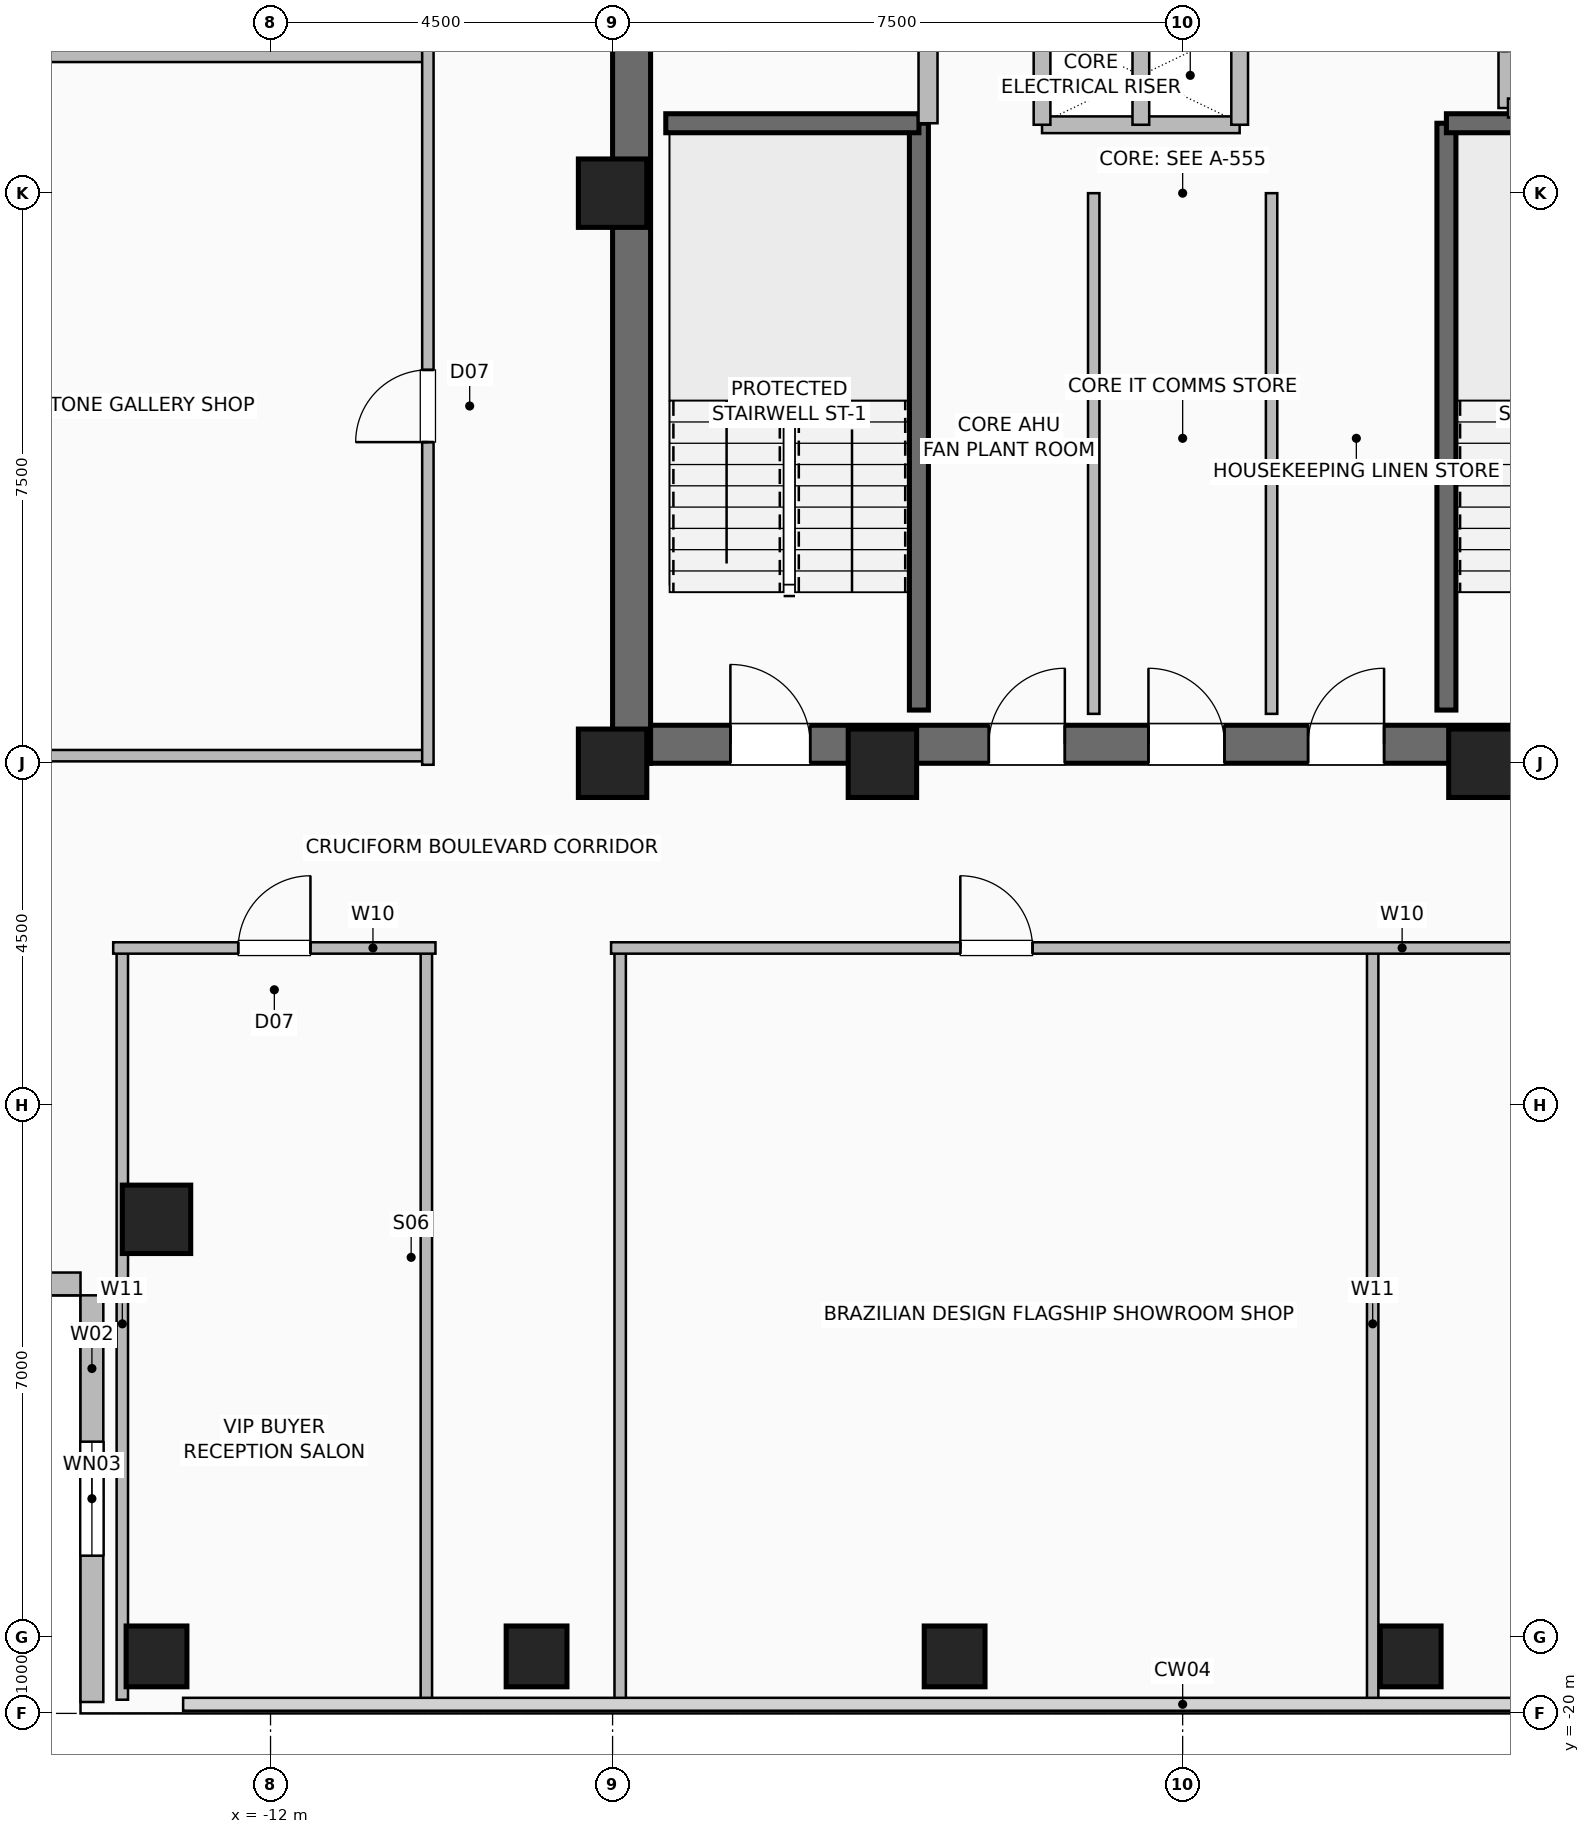
"""IFC4 building model, lengths in metres.
Left out: names, types, materials, properties, quantities, classifications, styles, units other than length and angle.
Written with IfcOpenShell. Run it as: python <this file> out.ifc"""

import sys

from ifc_helpers import new_model, si_unit, direction, frame, frame_2d, origin, origin_2d, place, context, subcontext, project, spatial, rectangle, hollow_rectangle, extrude, element, fill, save


model = new_model("IFC4")
c1 = context("Model", 3, precision=1e-05, world=origin(), true_north=direction((0.0, 1.0)))
c2 = subcontext(c1, "Body", "Model", "MODEL_VIEW")
j1 = project(units=[si_unit("LENGTHUNIT", "METRE"), si_unit("PLANEANGLEUNIT", "RADIAN")], contexts=[c1])
p1 = place(None, origin())
s1 = spatial("IfcSite", under=j1, at=p1, CompositionType="ELEMENT")
p2 = place(p1, origin())
s2 = spatial("IfcBuilding", under=s1, at=p2, CompositionType="ELEMENT")
p3 = place(p2, frame((0.0, 0.0, 220.2)))
s3 = spatial("IfcBuildingStorey", under=s2, at=p3, CompositionType="ELEMENT", Elevation=220.2)
for number, where, z_axis, x_axis in (
    (1, (-7.5, -7.5, 0.0), (0.0, 0.0, 1.0), (1.0, 0.0, 0.0)),
    (2, (-3.95, -7.5, 0.0), (0.0, 0.0, 1.0), (1.0, 0.0, 0.0)),
    (3, (3.95, -7.5, 0.0), (0.0, 0.0, 1.0), (1.0, 0.0, 0.0)),
    (4, (-7.5, 0.0, 0.0), (0.0, 0.0, 1.0), (1.0, 0.0, 0.0)),
):
    element("IfcColumn", number, at=place(p3, frame(where, z_axis=z_axis, x_axis=x_axis)), inside=s3, PredefinedType="COLUMN", context=c2, shape_type="SweptSolid", body=[
        extrude(hollow_rectangle(XDim=0.9, YDim=0.9, WallThickness=0.045, at=origin_2d()), origin(), (0.0, 0.0, 1.0), 3.6),
    ])
for number, where, z_axis, x_axis in (
    (5, (-13.5, -19.25, 0.0), (0.0, 0.0, 1.0), (1.0, 0.0, 0.0)),
    (6, (-8.5, -19.25, 0.0), (0.0, 0.0, 1.0), (1.0, 0.0, 0.0)),
    (7, (-3.0, -19.25, 0.0), (0.0, 0.0, 1.0), (1.0, 0.0, 0.0)),
    (8, (3.0, -19.25, 0.0), (0.0, 0.0, 1.0), (1.0, 0.0, 0.0)),
):
    element("IfcColumn", number, at=place(p3, frame(where, z_axis=z_axis, x_axis=x_axis)), inside=s3, PredefinedType="COLUMN", context=c2, shape_type="SweptSolid", body=[
        extrude(hollow_rectangle(XDim=0.8, YDim=0.8, WallThickness=0.04, at=origin_2d()), origin(), (0.0, 0.0, 1.0), 3.6),
    ])
p4 = place(p3, frame((-13.5, -13.5, 0.0), z_axis=(0.0, 0.0, 1.0), x_axis=(1.0, 0.0, 0.0)))
e9 = element("IfcColumn", 9, at=p4, inside=s3, PredefinedType="COLUMN", context=c2, shape_type="SweptSolid", body=[
    extrude(hollow_rectangle(XDim=0.9, YDim=0.9, WallThickness=0.045, at=origin_2d()), origin(), (0.0, 0.0, 1.0), 3.6),
])
p5 = place(p3, frame((-14.35, -19.85, 0.0), z_axis=(0.0, 0.0, 1.0), x_axis=(0.0, 1.0, 0.0)))
e10 = element("IfcWall", 10, at=p5, inside=s3, PredefinedType="SOLIDWALL", context=c2, shape_type="SweptSolid", body=[
    extrude(rectangle(XDim=5.35, YDim=0.3, at=frame_2d((2.675, 0.0))), origin(), (0.0, 0.0, 1.0), 3.36),
])
p6 = place(p5, frame((1.925, 0.0, 0.9)))
e11 = element("IfcOpeningElement", 11, at=p6, cuts=e10, PredefinedType="OPENING", context=c2, shape_type="SweptSolid", body=[
    extrude(rectangle(XDim=1.5, YDim=1.8, at=frame_2d((0.75, 0.9))), frame((0.0, 0.16, 0.0), z_axis=(0.0, -1.0, 0.0), x_axis=(1.0, 0.0, 0.0)), (0.0, 0.0, 1.0), 0.32),
])
p7 = place(p3, frame((-19.85, -14.35, 0.0), z_axis=(0.0, 0.0, 1.0), x_axis=(1.0, 0.0, 0.0)))
e12 = element("IfcWall", 12, at=p7, inside=s3, PredefinedType="SOLIDWALL", context=c2, shape_type="SweptSolid", body=[
    extrude(rectangle(XDim=5.35, YDim=0.3, at=frame_2d((2.675, 0.0))), origin(), (0.0, 0.0, 1.0), 3.36),
])
p8 = place(p3, frame((-7.5, -7.25, 0.0), z_axis=(0.0, 0.0, 1.0), x_axis=(1.0, 0.0, 0.0)))
e13 = element("IfcWall", 13, at=p8, inside=s3, PredefinedType="SHEAR", context=c2, shape_type="SweptSolid", body=[
    extrude(rectangle(XDim=15.0, YDim=0.5, at=frame_2d((7.5, 0.0))), origin(), (0.0, 0.0, 1.0), 3.36),
])
p9 = place(p8, frame((1.55, 0.0, 0.0)))
e14 = element("IfcOpeningElement", 14, at=p9, cuts=e13, PredefinedType="OPENING", context=c2, shape_type="SweptSolid", body=[
    extrude(rectangle(XDim=1.05, YDim=2.08, at=frame_2d((0.525, 1.04))), frame((0.0, 0.26, 0.0), z_axis=(0.0, -1.0, 0.0), x_axis=(1.0, 0.0, 0.0)), (0.0, 0.0, 1.0), 0.52),
])
p10 = place(p8, frame((12.4, 0.0, 0.0)))
e15 = element("IfcOpeningElement", 15, at=p10, cuts=e13, PredefinedType="OPENING", context=c2, shape_type="SweptSolid", body=[
    extrude(rectangle(XDim=1.05, YDim=2.08, at=frame_2d((0.525, 1.04))), frame((0.0, 0.26, 0.0), z_axis=(0.0, -1.0, 0.0), x_axis=(1.0, 0.0, 0.0)), (0.0, 0.0, 1.0), 0.52),
])
p11 = place(p8, frame((4.95, 0.0, 0.0)))
e16 = element("IfcOpeningElement", 16, at=p11, cuts=e13, PredefinedType="OPENING", context=c2, shape_type="SweptSolid", body=[
    extrude(rectangle(XDim=1.0, YDim=2.08, at=frame_2d((0.5, 1.04))), frame((0.0, 0.26, 0.0), z_axis=(0.0, -1.0, 0.0), x_axis=(1.0, 0.0, 0.0)), (0.0, 0.0, 1.0), 0.52),
])
p12 = place(p8, frame((7.05, 0.0, 0.0)))
e17 = element("IfcOpeningElement", 17, at=p12, cuts=e13, PredefinedType="OPENING", context=c2, shape_type="SweptSolid", body=[
    extrude(rectangle(XDim=1.0, YDim=2.08, at=frame_2d((0.5, 1.04))), frame((0.0, 0.26, 0.0), z_axis=(0.0, -1.0, 0.0), x_axis=(1.0, 0.0, 0.0)), (0.0, 0.0, 1.0), 0.52),
])
p13 = place(p8, frame((9.15, 0.0, 0.0)))
e18 = element("IfcOpeningElement", 18, at=p13, cuts=e13, PredefinedType="OPENING", context=c2, shape_type="SweptSolid", body=[
    extrude(rectangle(XDim=1.0, YDim=2.08, at=frame_2d((0.5, 1.04))), frame((0.0, 0.26, 0.0), z_axis=(0.0, -1.0, 0.0), x_axis=(1.0, 0.0, 0.0)), (0.0, 0.0, 1.0), 0.52),
])
p14 = place(p3, frame((-7.25, -7.5, 0.0), z_axis=(0.0, 0.0, 1.0), x_axis=(0.0, 1.0, 0.0)))
e19 = element("IfcWall", 19, at=p14, inside=s3, PredefinedType="SHEAR", context=c2, shape_type="SweptSolid", body=[
    extrude(rectangle(XDim=15.0, YDim=0.5, at=frame_2d((7.5, 0.0))), origin(), (0.0, 0.0, 1.0), 3.36),
])
p15 = place(p14, frame((9.5, 0.0, 0.0)))
e20 = element("IfcOpeningElement", 20, at=p15, cuts=e19, PredefinedType="OPENING", context=c2, shape_type="SweptSolid", body=[
    extrude(rectangle(XDim=1.0, YDim=2.08, at=frame_2d((0.5, 1.04))), frame((0.0, 0.26, 0.0), z_axis=(0.0, -1.0, 0.0), x_axis=(1.0, 0.0, 0.0)), (0.0, 0.0, 1.0), 0.52),
])
p16 = place(p3, frame((-3.47, -6.8, 0.0), z_axis=(0.0, 0.0, 1.0), x_axis=(0.0, 1.0, 0.0)))
e21 = element("IfcWall", 21, at=p16, inside=s3, PredefinedType="SHEAR", context=c2, shape_type="SweptSolid", body=[
    extrude(rectangle(XDim=7.72, YDim=0.25, at=frame_2d((3.86, 0.0))), origin(), (0.0, 0.0, 1.0), 3.36),
])
p17 = place(p3, frame((-6.8, 0.92, 0.0), z_axis=(0.0, 0.0, 1.0), x_axis=(1.0, 0.0, 0.0)))
e22 = element("IfcWall", 22, at=p17, inside=s3, PredefinedType="SHEAR", context=c2, shape_type="SweptSolid", body=[
    extrude(rectangle(XDim=3.33, YDim=0.25, at=frame_2d((1.665, 0.0))), origin(), (0.0, 0.0, 1.0), 3.36),
])
p18 = place(p3, frame((3.47, -6.8, 0.0), z_axis=(0.0, 0.0, 1.0), x_axis=(0.0, 1.0, 0.0)))
e23 = element("IfcWall", 23, at=p18, inside=s3, PredefinedType="SHEAR", context=c2, shape_type="SweptSolid", body=[
    extrude(rectangle(XDim=7.72, YDim=0.25, at=frame_2d((3.86, 0.0))), origin(), (0.0, 0.0, 1.0), 3.36),
])
p19 = place(p3, frame((3.47, 0.92, 0.0), z_axis=(0.0, 0.0, 1.0), x_axis=(1.0, 0.0, 0.0)))
e24 = element("IfcWall", 24, at=p19, inside=s3, PredefinedType="SHEAR", context=c2, shape_type="SweptSolid", body=[
    extrude(rectangle(XDim=3.33, YDim=0.25, at=frame_2d((1.665, 0.0))), origin(), (0.0, 0.0, 1.0), 3.36),
])
p20 = place(p3, frame((-1.85, 0.9, 0.0), z_axis=(0.0, 0.0, 1.0), x_axis=(1.0, 0.0, 0.0)))
e25 = element("IfcWall", 25, at=p20, inside=s3, PredefinedType="PARTITIONING", context=c2, shape_type="SweptSolid", body=[
    extrude(rectangle(XDim=2.6, YDim=0.22, at=frame_2d((1.3, 0.0))), origin(), (0.0, 0.0, 1.0), 3.36),
])
for number, where, z_axis, x_axis in (
    (26, (-0.55, 0.9, 0.0), (0.0, 0.0, 1.0), (0.0, 1.0, 0.0)),
    (27, (0.75, 0.9, 0.0), (0.0, 0.0, 1.0), (0.0, 1.0, 0.0)),
    (28, (-1.85, 0.9, 0.0), (0.0, 0.0, 1.0), (0.0, 1.0, 0.0)),
):
    element("IfcWall", number, at=place(p3, frame(where, z_axis=z_axis, x_axis=x_axis)), inside=s3, PredefinedType="PARTITIONING", context=c2, shape_type="SweptSolid", body=[
        extrude(rectangle(XDim=1.3, YDim=0.22, at=frame_2d((0.65, 0.0))), origin(), (0.0, 0.0, 1.0), 3.36),
    ])
p21 = place(p3, frame((4.28, 1.12, 0.0), z_axis=(0.0, 0.0, 1.0), x_axis=(0.0, 1.0, 0.0)))
e29 = element("IfcWall", 29, at=p21, inside=s3, PredefinedType="SHEAR", context=c2, shape_type="SweptSolid", body=[
    extrude(rectangle(XDim=2.9, YDim=0.25, at=frame_2d((1.45, 0.0))), origin(), (0.0, 0.0, 1.0), 3.36),
])
p22 = place(p21, frame((0.75, 0.0, 0.0)))
e30 = element("IfcOpeningElement", 30, at=p22, cuts=e29, PredefinedType="OPENING", context=c2, shape_type="SweptSolid", body=[
    extrude(rectangle(XDim=1.3, YDim=2.3, at=frame_2d((0.65, 1.15))), frame((0.0, 0.135, 0.0), z_axis=(0.0, -1.0, 0.0), x_axis=(1.0, 0.0, 0.0)), (0.0, 0.0, 1.0), 0.27),
])
p23 = place(p3, frame((4.28, 1.12, 0.0), z_axis=(0.0, 0.0, 1.0), x_axis=(1.0, 0.0, 0.0)))
e31 = element("IfcWall", 31, at=p23, inside=s3, PredefinedType="SHEAR", context=c2, shape_type="SweptSolid", body=[
    extrude(rectangle(XDim=2.52, YDim=0.25, at=frame_2d((1.26, 0.0))), origin(), (0.0, 0.0, 1.0), 3.36),
])
p24 = place(p3, frame((-3.35, 0.92, 0.0), z_axis=(0.0, 0.0, 1.0), x_axis=(0.0, 1.0, 0.0)))
e32 = element("IfcWall", 32, at=p24, inside=s3, PredefinedType="SHEAR", context=c2, shape_type="SweptSolid", body=[
    extrude(rectangle(XDim=3.62, YDim=0.25, at=frame_2d((1.81, 0.0))), origin(), (0.0, 0.0, 1.0), 3.36),
])
p25 = place(p24, frame((1.85, 0.0, 0.0)))
e33 = element("IfcOpeningElement", 33, at=p25, cuts=e32, PredefinedType="OPENING", context=c2, shape_type="SweptSolid", body=[
    extrude(rectangle(XDim=1.0, YDim=2.08, at=frame_2d((0.5, 1.04))), frame((0.0, 0.135, 0.0), z_axis=(0.0, -1.0, 0.0), x_axis=(1.0, 0.0, 0.0)), (0.0, 0.0, 1.0), 0.27),
])
for number, where, z_axis, x_axis in (
    (34, (-1.17, -6.85, 0.0), (0.0, 0.0, 1.0), (0.0, 1.0, 0.0)),
    (35, (1.17, -6.85, 0.0), (0.0, 0.0, 1.0), (0.0, 1.0, 0.0)),
):
    element("IfcWall", number, at=place(p3, frame(where, z_axis=z_axis, x_axis=x_axis)), inside=s3, PredefinedType="PARTITIONING", context=c2, shape_type="SweptSolid", body=[
        extrude(rectangle(XDim=6.85, YDim=0.15, at=frame_2d((3.425, 0.0))), origin(), (0.0, 0.0, 1.0), 3.36),
    ])
for number, where, z_axis, x_axis in (
    (36, (-13.95, -19.82, 0.0), (0.0, 0.0, 1.0), (0.0, 1.0, 0.0)),
    (37, (-9.95, -19.82, 0.0), (0.0, 0.0, 1.0), (0.0, 1.0, 0.0)),
):
    element("IfcWall", number, at=place(p3, frame(where, z_axis=z_axis, x_axis=x_axis)), inside=s3, PredefinedType="PARTITIONING", context=c2, shape_type="SweptSolid", body=[
        extrude(rectangle(XDim=9.89, YDim=0.15, at=frame_2d((4.945, 0.0))), origin(), (0.0, 0.0, 1.0), 3.36),
    ])
p26 = place(p3, frame((-14.07, -9.93, 0.0), z_axis=(0.0, 0.0, 1.0), x_axis=(1.0, 0.0, 0.0)))
e38 = element("IfcWall", 38, at=p26, inside=s3, PredefinedType="PARTITIONING", context=c2, shape_type="SweptSolid", body=[
    extrude(rectangle(XDim=4.24, YDim=0.15, at=frame_2d((2.12, 0.0))), origin(), (0.0, 0.0, 1.0), 3.36),
])
p27 = place(p26, frame((1.645, 0.0, 0.0)))
e39 = element("IfcOpeningElement", 39, at=p27, cuts=e38, PredefinedType="OPENING", context=c2, shape_type="SweptSolid", body=[
    extrude(rectangle(XDim=0.95, YDim=2.06, at=frame_2d((0.475, 1.03))), frame((0.0, 0.085, 0.0), z_axis=(0.0, -1.0, 0.0), x_axis=(1.0, 0.0, 0.0)), (0.0, 0.0, 1.0), 0.17),
])
for number, where, z_axis, x_axis in (
    (40, (-7.4, -19.82, 0.0), (0.0, 0.0, 1.0), (0.0, 1.0, 0.0)),
    (41, (2.5, -19.82, 0.0), (0.0, 0.0, 1.0), (0.0, 1.0, 0.0)),
):
    element("IfcWall", number, at=place(p3, frame(where, z_axis=z_axis, x_axis=x_axis)), inside=s3, PredefinedType="PARTITIONING", context=c2, shape_type="SweptSolid", body=[
        extrude(rectangle(XDim=9.89, YDim=0.15, at=frame_2d((4.945, 0.0))), origin(), (0.0, 0.0, 1.0), 3.36),
    ])
p28 = place(p3, frame((-7.52, -9.93, 0.0), z_axis=(0.0, 0.0, 1.0), x_axis=(1.0, 0.0, 0.0)))
e42 = element("IfcWall", 42, at=p28, inside=s3, PredefinedType="PARTITIONING", context=c2, shape_type="SweptSolid", body=[
    extrude(rectangle(XDim=21.59, YDim=0.15, at=frame_2d((10.795, 0.0))), origin(), (0.0, 0.0, 1.0), 3.36),
])
p29 = place(p28, frame((4.595, 0.0, 0.0)))
e43 = element("IfcOpeningElement", 43, at=p29, cuts=e42, PredefinedType="OPENING", context=c2, shape_type="SweptSolid", body=[
    extrude(rectangle(XDim=0.95, YDim=2.06, at=frame_2d((0.475, 1.03))), frame((0.0, 0.085, 0.0), z_axis=(0.0, -1.0, 0.0), x_axis=(1.0, 0.0, 0.0)), (0.0, 0.0, 1.0), 0.17),
])
p30 = place(p28, frame((15.27, 0.0, 0.0)))
e44 = element("IfcOpeningElement", 44, at=p30, cuts=e42, PredefinedType="OPENING", context=c2, shape_type="SweptSolid", body=[
    extrude(rectangle(XDim=0.95, YDim=2.06, at=frame_2d((0.475, 1.03))), frame((0.0, 0.085, 0.0), z_axis=(0.0, -1.0, 0.0), x_axis=(1.0, 0.0, 0.0)), (0.0, 0.0, 1.0), 0.17),
])
for number, where, z_axis, x_axis in (
    (45, (-19.82, -7.4, 0.0), (0.0, 0.0, 1.0), (1.0, 0.0, 0.0)),
    (46, (-19.82, 1.8, 0.0), (0.0, 0.0, 1.0), (1.0, 0.0, 0.0)),
):
    element("IfcWall", number, at=place(p3, frame(where, z_axis=z_axis, x_axis=x_axis)), inside=s3, PredefinedType="PARTITIONING", context=c2, shape_type="SweptSolid", body=[
        extrude(rectangle(XDim=9.89, YDim=0.15, at=frame_2d((4.945, 0.0))), origin(), (0.0, 0.0, 1.0), 3.36),
    ])
p31 = place(p3, frame((-9.93, -7.52, 0.0), z_axis=(0.0, 0.0, 1.0), x_axis=(0.0, 1.0, 0.0)))
e47 = element("IfcWall", 47, at=p31, inside=s3, PredefinedType="PARTITIONING", context=c2, shape_type="SweptSolid", body=[
    extrude(rectangle(XDim=21.59, YDim=0.15, at=frame_2d((10.795, 0.0))), origin(), (0.0, 0.0, 1.0), 3.36),
])
p32 = place(p31, frame((4.245, 0.0, 0.0)))
e48 = element("IfcOpeningElement", 48, at=p32, cuts=e47, PredefinedType="OPENING", context=c2, shape_type="SweptSolid", body=[
    extrude(rectangle(XDim=0.95, YDim=2.06, at=frame_2d((0.475, 1.03))), frame((0.0, 0.085, 0.0), z_axis=(0.0, -1.0, 0.0), x_axis=(1.0, 0.0, 0.0)), (0.0, 0.0, 1.0), 0.17),
])
p33 = place(p31, frame((14.92, 0.0, 0.0)))
e49 = element("IfcOpeningElement", 49, at=p33, cuts=e47, PredefinedType="OPENING", context=c2, shape_type="SweptSolid", body=[
    extrude(rectangle(XDim=0.95, YDim=2.06, at=frame_2d((0.475, 1.03))), frame((0.0, 0.085, 0.0), z_axis=(0.0, -1.0, 0.0), x_axis=(1.0, 0.0, 0.0)), (0.0, 0.0, 1.0), 0.17),
])
p34 = place(p6, origin())
e50 = element("IfcWindow", 50, at=p34, inside=s3, PartitioningType="SINGLE_PANEL", PredefinedType="WINDOW", context=c2, shape_type="SweptSolid", body=[
    extrude(rectangle(XDim=1.5, YDim=1.8, at=frame_2d((0.75, 0.9))), frame((0.0, 0.03, 0.0), z_axis=(0.0, -1.0, 0.0), x_axis=(1.0, 0.0, 0.0)), (0.0, 0.0, 1.0), 0.06),
])
fill(e11, e50)
p35 = place(p9, origin())
e51 = element("IfcDoor", 51, at=p35, inside=s3, OperationType="SINGLE_SWING_LEFT", PredefinedType="DOOR", context=c2, shape_type="SweptSolid", body=[
    extrude(rectangle(XDim=1.05, YDim=2.08, at=frame_2d((0.525, 1.04))), frame((0.0, 0.025, 0.0), z_axis=(0.0, -1.0, 0.0), x_axis=(1.0, 0.0, 0.0)), (0.0, 0.0, 1.0), 0.05),
])
fill(e14, e51)
p36 = place(p11, origin())
e52 = element("IfcDoor", 52, at=p36, inside=s3, OperationType="SINGLE_SWING_RIGHT", PredefinedType="DOOR", context=c2, shape_type="SweptSolid", body=[
    extrude(rectangle(XDim=1.0, YDim=2.08, at=frame_2d((0.5, 1.04))), frame((0.0, 0.025, 0.0), z_axis=(0.0, -1.0, 0.0), x_axis=(1.0, 0.0, 0.0)), (0.0, 0.0, 1.0), 0.05),
])
fill(e16, e52)
p37 = place(p12, origin())
e53 = element("IfcDoor", 53, at=p37, inside=s3, OperationType="SINGLE_SWING_LEFT", PredefinedType="DOOR", context=c2, shape_type="SweptSolid", body=[
    extrude(rectangle(XDim=1.0, YDim=2.08, at=frame_2d((0.5, 1.04))), frame((0.0, 0.025, 0.0), z_axis=(0.0, -1.0, 0.0), x_axis=(1.0, 0.0, 0.0)), (0.0, 0.0, 1.0), 0.05),
])
fill(e17, e53)
p38 = place(p13, origin())
e54 = element("IfcDoor", 54, at=p38, inside=s3, OperationType="SINGLE_SWING_RIGHT", PredefinedType="DOOR", context=c2, shape_type="SweptSolid", body=[
    extrude(rectangle(XDim=1.0, YDim=2.08, at=frame_2d((0.5, 1.04))), frame((0.0, 0.025, 0.0), z_axis=(0.0, -1.0, 0.0), x_axis=(1.0, 0.0, 0.0)), (0.0, 0.0, 1.0), 0.05),
])
fill(e18, e54)
p39 = place(p27, origin())
e55 = element("IfcDoor", 55, at=p39, inside=s3, OperationType="SINGLE_SWING_RIGHT", PredefinedType="DOOR", context=c2, shape_type="SweptSolid", body=[
    extrude(rectangle(XDim=0.95, YDim=2.06, at=frame_2d((0.475, 1.03))), frame((0.0, 0.025, 0.0), z_axis=(0.0, -1.0, 0.0), x_axis=(1.0, 0.0, 0.0)), (0.0, 0.0, 1.0), 0.05),
])
fill(e39, e55)
p40 = place(p29, origin())
e56 = element("IfcDoor", 56, at=p40, inside=s3, OperationType="SINGLE_SWING_LEFT", PredefinedType="DOOR", context=c2, shape_type="SweptSolid", body=[
    extrude(rectangle(XDim=0.95, YDim=2.06, at=frame_2d((0.475, 1.03))), frame((0.0, 0.025, 0.0), z_axis=(0.0, -1.0, 0.0), x_axis=(1.0, 0.0, 0.0)), (0.0, 0.0, 1.0), 0.05),
])
fill(e43, e56)
p41 = place(p32, origin())
e57 = element("IfcDoor", 57, at=p41, inside=s3, OperationType="SINGLE_SWING_LEFT", PredefinedType="DOOR", context=c2, shape_type="SweptSolid", body=[
    extrude(rectangle(XDim=0.95, YDim=2.06, at=frame_2d((0.475, 1.03))), frame((0.0, 0.025, 0.0), z_axis=(0.0, -1.0, 0.0), x_axis=(1.0, 0.0, 0.0)), (0.0, 0.0, 1.0), 0.05),
])
fill(e48, e57)
save(model, sys.argv[1])
